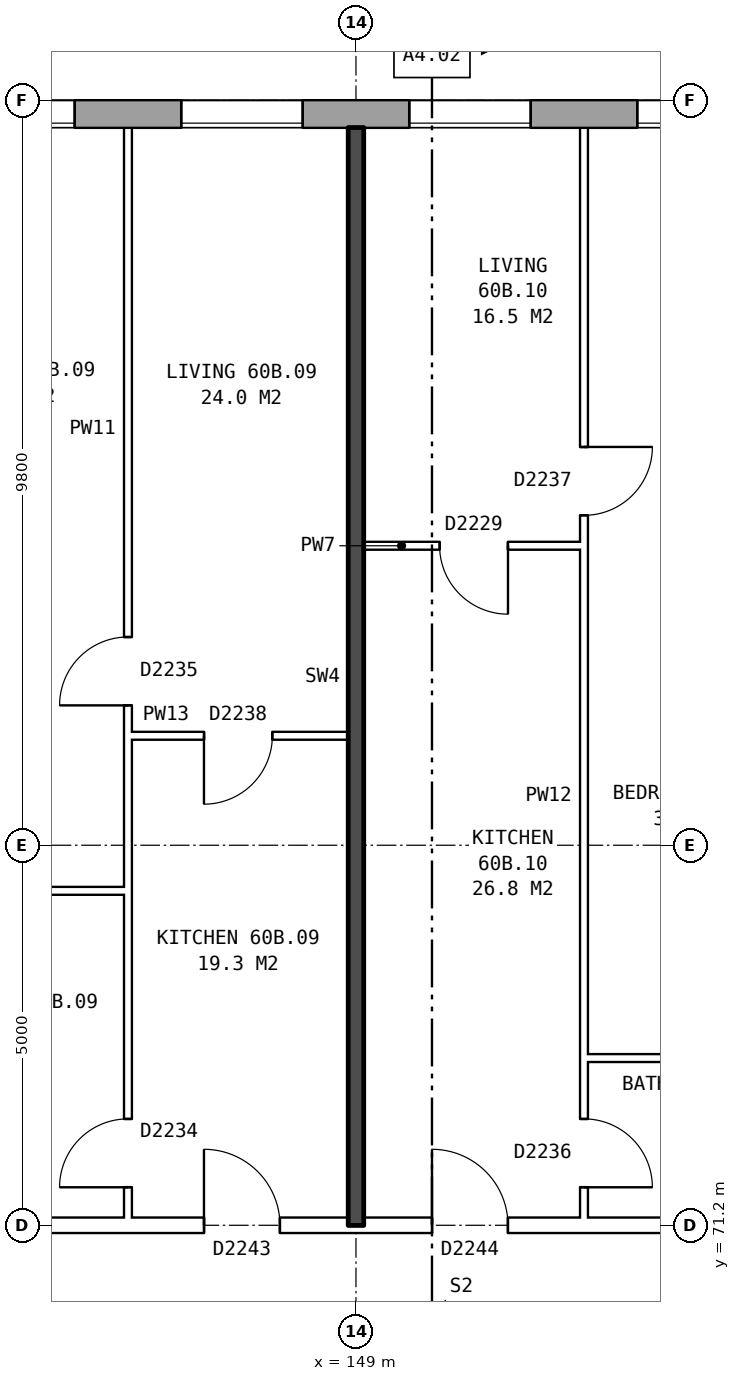
"""IFC4 building model, lengths in metres.
Left out: names, types, materials, properties, quantities, classifications, styles, units other than length and angle.
Written with IfcOpenShell. Run it as: python <this file> out.ifc"""

import sys

from ifc_helpers import new_model, si_unit, direction, frame, frame_2d, origin, place, context, subcontext, project, spatial, rectangle, extrude, element, fill, save


model = new_model("IFC4")
c1 = context("Model", 3, precision=1e-05, world=origin(), true_north=direction((0.0, 1.0)))
c2 = subcontext(c1, "Body", "Model", "MODEL_VIEW")
j1 = project(units=[si_unit("LENGTHUNIT", "METRE"), si_unit("PLANEANGLEUNIT", "RADIAN")], contexts=[c1])
p1 = place(None, origin())
s1 = spatial("IfcSite", under=j1, at=p1, CompositionType="ELEMENT")
p2 = place(p1, origin())
s2 = spatial("IfcBuilding", under=s1, at=p2, CompositionType="ELEMENT")
p3 = place(p2, frame((0.0, 0.0, 212.1)))
s3 = spatial("IfcBuildingStorey", under=s2, at=p3, CompositionType="ELEMENT", Elevation=212.1)
p4 = place(p3, frame((165.925, 85.82, 0.0), z_axis=(0.0, 0.0, 1.0), x_axis=(-1.0, 0.0, 0.0)))
e1 = element("IfcWall", 1, at=p4, inside=s3, PredefinedType="STANDARD", context=c2, shape_type="SweptSolid", body=[
    extrude(rectangle(XDim=33.875, YDim=0.36, at=frame_2d((16.938, 0.0))), origin(), (0.0, 0.0, 1.0), 2.85),
])
p5 = place(p4, frame((0.3, 0.0, 0.8)))
e2 = element("IfcOpeningElement", 2, at=p5, cuts=e1, PredefinedType="OPENING", context=c2, shape_type="SweptSolid", body=[
    extrude(rectangle(XDim=0.6, YDim=1.8, at=frame_2d((0.3, 0.9))), frame((0.0, 0.19, 0.0), z_axis=(0.0, -1.0, 0.0), x_axis=(1.0, 0.0, 0.0)), (0.0, 0.0, 1.0), 0.38),
])
p6 = place(p4, frame((5.625, 0.0, 0.8)))
e3 = element("IfcOpeningElement", 3, at=p6, cuts=e1, PredefinedType="OPENING", context=c2, shape_type="SweptSolid", body=[
    extrude(rectangle(XDim=1.6, YDim=1.8, at=frame_2d((0.8, 0.9))), frame((0.0, 0.19, 0.0), z_axis=(0.0, -1.0, 0.0), x_axis=(1.0, 0.0, 0.0)), (0.0, 0.0, 1.0), 0.38),
])
p7 = place(p4, frame((8.625, 0.0, 0.8)))
e4 = element("IfcOpeningElement", 4, at=p7, cuts=e1, PredefinedType="OPENING", context=c2, shape_type="SweptSolid", body=[
    extrude(rectangle(XDim=1.6, YDim=1.8, at=frame_2d((0.8, 0.9))), frame((0.0, 0.19, 0.0), z_axis=(0.0, -1.0, 0.0), x_axis=(1.0, 0.0, 0.0)), (0.0, 0.0, 1.0), 0.38),
])
p8 = place(p4, frame((11.625, 0.0, 0.8)))
e5 = element("IfcOpeningElement", 5, at=p8, cuts=e1, PredefinedType="OPENING", context=c2, shape_type="SweptSolid", body=[
    extrude(rectangle(XDim=1.6, YDim=1.8, at=frame_2d((0.8, 0.9))), frame((0.0, 0.19, 0.0), z_axis=(0.0, -1.0, 0.0), x_axis=(1.0, 0.0, 0.0)), (0.0, 0.0, 1.0), 0.38),
])
p9 = place(p4, frame((14.625, 0.0, 0.8)))
e6 = element("IfcOpeningElement", 6, at=p9, cuts=e1, PredefinedType="OPENING", context=c2, shape_type="SweptSolid", body=[
    extrude(rectangle(XDim=1.6, YDim=1.8, at=frame_2d((0.8, 0.9))), frame((0.0, 0.19, 0.0), z_axis=(0.0, -1.0, 0.0), x_axis=(1.0, 0.0, 0.0)), (0.0, 0.0, 1.0), 0.38),
])
p10 = place(p4, frame((17.625, 0.0, 0.8)))
e7 = element("IfcOpeningElement", 7, at=p10, cuts=e1, PredefinedType="OPENING", context=c2, shape_type="SweptSolid", body=[
    extrude(rectangle(XDim=1.6, YDim=1.8, at=frame_2d((0.8, 0.9))), frame((0.0, 0.19, 0.0), z_axis=(0.0, -1.0, 0.0), x_axis=(1.0, 0.0, 0.0)), (0.0, 0.0, 1.0), 0.38),
])
p11 = place(p4, frame((20.625, 0.0, 0.8)))
e8 = element("IfcOpeningElement", 8, at=p11, cuts=e1, PredefinedType="OPENING", context=c2, shape_type="SweptSolid", body=[
    extrude(rectangle(XDim=1.6, YDim=1.8, at=frame_2d((0.8, 0.9))), frame((0.0, 0.19, 0.0), z_axis=(0.0, -1.0, 0.0), x_axis=(1.0, 0.0, 0.0)), (0.0, 0.0, 1.0), 0.38),
])
p12 = place(p4, frame((23.625, 0.0, 0.8)))
e9 = element("IfcOpeningElement", 9, at=p12, cuts=e1, PredefinedType="OPENING", context=c2, shape_type="SweptSolid", body=[
    extrude(rectangle(XDim=1.6, YDim=1.8, at=frame_2d((0.8, 0.9))), frame((0.0, 0.19, 0.0), z_axis=(0.0, -1.0, 0.0), x_axis=(1.0, 0.0, 0.0)), (0.0, 0.0, 1.0), 0.38),
])
p13 = place(p4, frame((25.525, 0.0, 0.8)))
e10 = element("IfcOpeningElement", 10, at=p13, cuts=e1, PredefinedType="OPENING", context=c2, shape_type="SweptSolid", body=[
    extrude(rectangle(XDim=1.6, YDim=1.8, at=frame_2d((0.8, 0.9))), frame((0.0, 0.19, 0.0), z_axis=(0.0, -1.0, 0.0), x_axis=(1.0, 0.0, 0.0)), (0.0, 0.0, 1.0), 0.38),
])
p14 = place(p4, frame((29.625, 0.0, 0.8)))
e11 = element("IfcOpeningElement", 11, at=p14, cuts=e1, PredefinedType="OPENING", context=c2, shape_type="SweptSolid", body=[
    extrude(rectangle(XDim=1.6, YDim=1.8, at=frame_2d((0.8, 0.9))), frame((0.0, 0.19, 0.0), z_axis=(0.0, -1.0, 0.0), x_axis=(1.0, 0.0, 0.0)), (0.0, 0.0, 1.0), 0.38),
])
p15 = place(p4, frame((1.2, 0.0, 1.1)))
e12 = element("IfcOpeningElement", 12, at=p15, cuts=e1, PredefinedType="OPENING", context=c2, shape_type="SweptSolid", body=[
    extrude(rectangle(XDim=1.4, YDim=1.5, at=frame_2d((0.7, 0.75))), frame((0.0, 0.19, 0.0), z_axis=(0.0, -1.0, 0.0), x_axis=(1.0, 0.0, 0.0)), (0.0, 0.0, 1.0), 0.38),
])
p16 = place(p4, frame((4.05, 0.0, 0.8)))
e13 = element("IfcOpeningElement", 13, at=p16, cuts=e1, PredefinedType="OPENING", context=c2, shape_type="SweptSolid", body=[
    extrude(rectangle(XDim=0.6, YDim=0.9, at=frame_2d((0.3, 0.45))), frame((0.0, 0.19, 0.0), z_axis=(0.0, -1.0, 0.0), x_axis=(1.0, 0.0, 0.0)), (0.0, 0.0, 1.0), 0.38),
])
p17 = place(p3, frame((142.76, 71.2, 0.0), z_axis=(0.0, 0.0, 1.0), x_axis=(1.0, 0.0, 0.0)))
e14 = element("IfcWall", 14, at=p17, inside=s3, PredefinedType="PARTITIONING", context=c2, shape_type="SweptSolid", body=[
    extrude(rectangle(XDim=14.48, YDim=0.2, at=frame_2d((7.24, 0.0))), origin(), (0.0, 0.0, 1.0), 2.85),
])
p18 = place(p17, frame((4.24, 0.0, 0.0)))
e15 = element("IfcOpeningElement", 15, at=p18, cuts=e14, PredefinedType="OPENING", context=c2, shape_type="SweptSolid", body=[
    extrude(rectangle(XDim=1.0, YDim=2.1, at=frame_2d((0.5, 1.05))), frame((0.0, 0.11, 0.0), z_axis=(0.0, -1.0, 0.0), x_axis=(1.0, 0.0, 0.0)), (0.0, 0.0, 1.0), 0.22),
])
p19 = place(p17, frame((7.24, 0.0, 0.0)))
e16 = element("IfcOpeningElement", 16, at=p19, cuts=e14, PredefinedType="OPENING", context=c2, shape_type="SweptSolid", body=[
    extrude(rectangle(XDim=1.0, YDim=2.1, at=frame_2d((0.5, 1.05))), frame((0.0, 0.11, 0.0), z_axis=(0.0, -1.0, 0.0), x_axis=(1.0, 0.0, 0.0)), (0.0, 0.0, 1.0), 0.22),
])
p20 = place(p3, frame((152.0, 73.4, 0.0), z_axis=(0.0, 0.0, 1.0), x_axis=(1.0, 0.0, 0.0)))
e17 = element("IfcWall", 17, at=p20, inside=s3, PredefinedType="PARTITIONING", context=c2, shape_type="SweptSolid", body=[
    extrude(rectangle(XDim=2.9, YDim=0.1, at=frame_2d((1.45, 0.0))), origin(), (0.0, 0.0, 1.0), 2.85),
])
p21 = place(p3, frame((142.76, 75.6, 0.0), z_axis=(0.0, 0.0, 1.0), x_axis=(1.0, 0.0, 0.0)))
e18 = element("IfcWall", 18, at=p21, inside=s3, PredefinedType="PARTITIONING", context=c2, shape_type="SweptSolid", body=[
    extrude(rectangle(XDim=3.24, YDim=0.1, at=frame_2d((1.62, 0.0))), origin(), (0.0, 0.0, 1.0), 2.85),
])
p22 = place(p3, frame((146.0, 77.64, 0.0), z_axis=(0.0, 0.0, 1.0), x_axis=(1.0, 0.0, 0.0)))
e19 = element("IfcWall", 19, at=p22, inside=s3, PredefinedType="PARTITIONING", context=c2, shape_type="SweptSolid", body=[
    extrude(rectangle(XDim=2.9, YDim=0.1, at=frame_2d((1.45, 0.0))), origin(), (0.0, 0.0, 1.0), 2.85),
])
p23 = place(p22, frame((1.0, 0.0, 0.0)))
e20 = element("IfcOpeningElement", 20, at=p23, cuts=e19, PredefinedType="OPENING", context=c2, shape_type="SweptSolid", body=[
    extrude(rectangle(XDim=0.9, YDim=2.1, at=frame_2d((0.45, 1.05))), frame((0.0, 0.06, 0.0), z_axis=(0.0, -1.0, 0.0), x_axis=(1.0, 0.0, 0.0)), (0.0, 0.0, 1.0), 0.12),
])
p24 = place(p3, frame((149.1, 80.14, 0.0), z_axis=(0.0, 0.0, 1.0), x_axis=(1.0, 0.0, 0.0)))
e21 = element("IfcWall", 21, at=p24, inside=s3, PredefinedType="PARTITIONING", context=c2, shape_type="SweptSolid", body=[
    extrude(rectangle(XDim=2.9, YDim=0.1, at=frame_2d((1.45, 0.0))), origin(), (0.0, 0.0, 1.0), 2.85),
])
p25 = place(p24, frame((1.0, 0.0, 0.0)))
e22 = element("IfcOpeningElement", 22, at=p25, cuts=e21, PredefinedType="OPENING", context=c2, shape_type="SweptSolid", body=[
    extrude(rectangle(XDim=0.9, YDim=2.1, at=frame_2d((0.45, 1.05))), frame((0.0, 0.06, 0.0), z_axis=(0.0, -1.0, 0.0), x_axis=(1.0, 0.0, 0.0)), (0.0, 0.0, 1.0), 0.12),
])
p26 = place(p3, frame((146.0, 71.3, 0.0), z_axis=(0.0, 0.0, 1.0), x_axis=(0.0, 1.0, 0.0)))
e23 = element("IfcWall", 23, at=p26, inside=s3, PredefinedType="PARTITIONING", context=c2, shape_type="SweptSolid", body=[
    extrude(rectangle(XDim=14.34, YDim=0.1, at=frame_2d((7.17, 0.0))), origin(), (0.0, 0.0, 1.0), 2.85),
])
p27 = place(p26, frame((6.74, 0.0, 0.0)))
e24 = element("IfcOpeningElement", 24, at=p27, cuts=e23, PredefinedType="OPENING", context=c2, shape_type="SweptSolid", body=[
    extrude(rectangle(XDim=0.9, YDim=2.1, at=frame_2d((0.45, 1.05))), frame((0.0, 0.06, 0.0), z_axis=(0.0, -1.0, 0.0), x_axis=(1.0, 0.0, 0.0)), (0.0, 0.0, 1.0), 0.12),
])
p28 = place(p26, frame((0.4, 0.0, 0.0)))
e25 = element("IfcOpeningElement", 25, at=p28, cuts=e23, PredefinedType="OPENING", context=c2, shape_type="SweptSolid", body=[
    extrude(rectangle(XDim=0.9, YDim=2.1, at=frame_2d((0.45, 1.05))), frame((0.0, 0.06, 0.0), z_axis=(0.0, -1.0, 0.0), x_axis=(1.0, 0.0, 0.0)), (0.0, 0.0, 1.0), 0.12),
])
p29 = place(p3, frame((149.0, 71.2, 0.0), z_axis=(0.0, 0.0, 1.0), x_axis=(0.0, 1.0, 0.0)))
e26 = element("IfcWall", 26, at=p29, inside=s3, PredefinedType="SOLIDWALL", context=c2, shape_type="SweptSolid", body=[
    extrude(rectangle(XDim=14.44, YDim=0.2, at=frame_2d((7.22, 0.0))), origin(), (0.0, 0.0, 1.0), 2.85),
])
p30 = place(p3, frame((152.0, 71.3, 0.0), z_axis=(0.0, 0.0, 1.0), x_axis=(0.0, 1.0, 0.0)))
e27 = element("IfcWall", 27, at=p30, inside=s3, PredefinedType="PARTITIONING", context=c2, shape_type="SweptSolid", body=[
    extrude(rectangle(XDim=14.34, YDim=0.1, at=frame_2d((7.17, 0.0))), origin(), (0.0, 0.0, 1.0), 2.85),
])
p31 = place(p30, frame((9.24, 0.0, 0.0)))
e28 = element("IfcOpeningElement", 28, at=p31, cuts=e27, PredefinedType="OPENING", context=c2, shape_type="SweptSolid", body=[
    extrude(rectangle(XDim=0.9, YDim=2.1, at=frame_2d((0.45, 1.05))), frame((0.0, 0.06, 0.0), z_axis=(0.0, -1.0, 0.0), x_axis=(1.0, 0.0, 0.0)), (0.0, 0.0, 1.0), 0.12),
])
p32 = place(p30, frame((0.4, 0.0, 0.0)))
e29 = element("IfcOpeningElement", 29, at=p32, cuts=e27, PredefinedType="OPENING", context=c2, shape_type="SweptSolid", body=[
    extrude(rectangle(XDim=0.9, YDim=2.1, at=frame_2d((0.45, 1.05))), frame((0.0, 0.06, 0.0), z_axis=(0.0, -1.0, 0.0), x_axis=(1.0, 0.0, 0.0)), (0.0, 0.0, 1.0), 0.12),
])
p33 = place(p8, origin())
e30 = element("IfcWindow", 30, at=p33, inside=s3, PartitioningType="SINGLE_PANEL", PredefinedType="WINDOW", context=c2, shape_type="SweptSolid", body=[
    extrude(rectangle(XDim=1.6, YDim=1.8, at=frame_2d((0.8, 0.9))), frame((0.0, 0.15, 0.0), z_axis=(0.0, -1.0, 0.0), x_axis=(1.0, 0.0, 0.0)), (0.0, 0.0, 1.0), 0.06),
])
fill(e5, e30)
p34 = place(p9, origin())
e31 = element("IfcWindow", 31, at=p34, inside=s3, PartitioningType="SINGLE_PANEL", PredefinedType="WINDOW", context=c2, shape_type="SweptSolid", body=[
    extrude(rectangle(XDim=1.6, YDim=1.8, at=frame_2d((0.8, 0.9))), frame((0.0, 0.15, 0.0), z_axis=(0.0, -1.0, 0.0), x_axis=(1.0, 0.0, 0.0)), (0.0, 0.0, 1.0), 0.06),
])
fill(e6, e31)
p35 = place(p10, origin())
e32 = element("IfcWindow", 32, at=p35, inside=s3, PartitioningType="SINGLE_PANEL", PredefinedType="WINDOW", context=c2, shape_type="SweptSolid", body=[
    extrude(rectangle(XDim=1.6, YDim=1.8, at=frame_2d((0.8, 0.9))), frame((0.0, 0.15, 0.0), z_axis=(0.0, -1.0, 0.0), x_axis=(1.0, 0.0, 0.0)), (0.0, 0.0, 1.0), 0.06),
])
fill(e7, e32)
p36 = place(p11, origin())
e33 = element("IfcWindow", 33, at=p36, inside=s3, PartitioningType="SINGLE_PANEL", PredefinedType="WINDOW", context=c2, shape_type="SweptSolid", body=[
    extrude(rectangle(XDim=1.6, YDim=1.8, at=frame_2d((0.8, 0.9))), frame((0.0, 0.15, 0.0), z_axis=(0.0, -1.0, 0.0), x_axis=(1.0, 0.0, 0.0)), (0.0, 0.0, 1.0), 0.06),
])
fill(e8, e33)
p37 = place(p27, origin())
e34 = element("IfcDoor", 34, at=p37, inside=s3, OperationType="SINGLE_SWING_LEFT", PredefinedType="DOOR", context=c2, shape_type="SweptSolid", body=[
    extrude(rectangle(XDim=0.9, YDim=2.1, at=frame_2d((0.45, 1.05))), frame((0.0, 0.025, 0.0), z_axis=(0.0, -1.0, 0.0), x_axis=(1.0, 0.0, 0.0)), (0.0, 0.0, 1.0), 0.05),
])
fill(e24, e34)
p38 = place(p18, origin())
e35 = element("IfcDoor", 35, at=p38, inside=s3, OperationType="SINGLE_SWING_LEFT", PredefinedType="DOOR", context=c2, shape_type="SweptSolid", body=[
    extrude(rectangle(XDim=1.0, YDim=2.1, at=frame_2d((0.5, 1.05))), frame((0.0, 0.025, 0.0), z_axis=(0.0, -1.0, 0.0), x_axis=(1.0, 0.0, 0.0)), (0.0, 0.0, 1.0), 0.05),
])
fill(e15, e35)
p39 = place(p23, frame((0.9, 0.0, 0.0), z_axis=(0.0, 0.0, 1.0), x_axis=(-1.0, 0.0, 0.0)))
e36 = element("IfcDoor", 36, at=p39, inside=s3, OperationType="SINGLE_SWING_RIGHT", PredefinedType="DOOR", context=c2, shape_type="SweptSolid", body=[
    extrude(rectangle(XDim=0.9, YDim=2.1, at=frame_2d((0.45, 1.05))), frame((0.0, 0.025, 0.0), z_axis=(0.0, -1.0, 0.0), x_axis=(1.0, 0.0, 0.0)), (0.0, 0.0, 1.0), 0.05),
])
fill(e20, e36)
p40 = place(p28, origin())
e37 = element("IfcDoor", 37, at=p40, inside=s3, OperationType="SINGLE_SWING_LEFT", PredefinedType="DOOR", context=c2, shape_type="SweptSolid", body=[
    extrude(rectangle(XDim=0.9, YDim=2.1, at=frame_2d((0.45, 1.05))), frame((0.0, 0.025, 0.0), z_axis=(0.0, -1.0, 0.0), x_axis=(1.0, 0.0, 0.0)), (0.0, 0.0, 1.0), 0.05),
])
fill(e25, e37)
p41 = place(p31, frame((0.9, 0.0, 0.0), z_axis=(0.0, 0.0, 1.0), x_axis=(-1.0, 0.0, 0.0)))
e38 = element("IfcDoor", 38, at=p41, inside=s3, OperationType="SINGLE_SWING_LEFT", PredefinedType="DOOR", context=c2, shape_type="SweptSolid", body=[
    extrude(rectangle(XDim=0.9, YDim=2.1, at=frame_2d((0.45, 1.05))), frame((0.0, 0.025, 0.0), z_axis=(0.0, -1.0, 0.0), x_axis=(1.0, 0.0, 0.0)), (0.0, 0.0, 1.0), 0.05),
])
fill(e28, e38)
p42 = place(p19, origin())
e39 = element("IfcDoor", 39, at=p42, inside=s3, OperationType="SINGLE_SWING_LEFT", PredefinedType="DOOR", context=c2, shape_type="SweptSolid", body=[
    extrude(rectangle(XDim=1.0, YDim=2.1, at=frame_2d((0.5, 1.05))), frame((0.0, 0.025, 0.0), z_axis=(0.0, -1.0, 0.0), x_axis=(1.0, 0.0, 0.0)), (0.0, 0.0, 1.0), 0.05),
])
fill(e16, e39)
p43 = place(p25, frame((0.9, 0.0, 0.0), z_axis=(0.0, 0.0, 1.0), x_axis=(-1.0, 0.0, 0.0)))
e40 = element("IfcDoor", 40, at=p43, inside=s3, OperationType="SINGLE_SWING_LEFT", PredefinedType="DOOR", context=c2, shape_type="SweptSolid", body=[
    extrude(rectangle(XDim=0.9, YDim=2.1, at=frame_2d((0.45, 1.05))), frame((0.0, 0.025, 0.0), z_axis=(0.0, -1.0, 0.0), x_axis=(1.0, 0.0, 0.0)), (0.0, 0.0, 1.0), 0.05),
])
fill(e22, e40)
p44 = place(p32, frame((0.9, 0.0, 0.0), z_axis=(0.0, 0.0, 1.0), x_axis=(-1.0, 0.0, 0.0)))
e41 = element("IfcDoor", 41, at=p44, inside=s3, OperationType="SINGLE_SWING_RIGHT", PredefinedType="DOOR", context=c2, shape_type="SweptSolid", body=[
    extrude(rectangle(XDim=0.9, YDim=2.1, at=frame_2d((0.45, 1.05))), frame((0.0, 0.025, 0.0), z_axis=(0.0, -1.0, 0.0), x_axis=(1.0, 0.0, 0.0)), (0.0, 0.0, 1.0), 0.05),
])
fill(e29, e41)
save(model, sys.argv[1])
